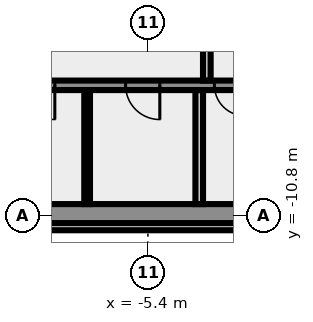
"""IFC4 building model, lengths in metres.
Left out: names, types, materials, properties, quantities, classifications, styles, units other than length and angle.
Written with IfcOpenShell. Run it as: python <this file> out.ifc"""

import sys

from ifc_helpers import new_model, si_unit, direction, frame, frame_2d, origin, place, context, subcontext, project, spatial, rectangle, extrude, element, fill, save


model = new_model("IFC4")
c1 = context("Model", 3, precision=1e-05, world=origin(), true_north=direction((0.0, 1.0)))
c2 = subcontext(c1, "Body", "Model", "MODEL_VIEW")
j1 = project(units=[si_unit("LENGTHUNIT", "METRE"), si_unit("PLANEANGLEUNIT", "RADIAN")], contexts=[c1])
p1 = place(None, origin())
s1 = spatial("IfcSite", under=j1, at=p1, CompositionType="ELEMENT")
p2 = place(p1, origin())
s2 = spatial("IfcBuilding", under=s1, at=p2, CompositionType="ELEMENT")
p3 = place(p2, frame((0.0, 0.0, 144.0)))
s3 = spatial("IfcBuildingStorey", under=s2, at=p3, CompositionType="ELEMENT", Elevation=144.0)
p4 = place(p3, frame((-17.444, -11.088, 0.0), z_axis=(0.0, 0.0, 1.0), x_axis=(1.0, 0.0, 0.0)))
e1 = element("IfcWall", 1, at=p4, inside=s3, PredefinedType="SOLIDWALL", context=c2, shape_type="SweptSolid", body=[
    extrude(rectangle(XDim=34.888, YDim=0.2, at=frame_2d((17.444, 0.0))), origin(), (0.0, 0.0, 1.0), 3.65),
])
p5 = place(p3, frame((-20.0, -10.75, 0.0), z_axis=(0.0, 0.0, 1.0), x_axis=(1.0, 0.0, 0.0)))
e2 = element("IfcWall", 2, at=p5, inside=s3, PredefinedType="SHEAR", context=c2, shape_type="SweptSolid", body=[
    extrude(rectangle(XDim=40.0, YDim=0.5, at=frame_2d((20.0, 0.0))), origin(), (0.0, 0.0, 1.0), 3.65),
])
p6 = place(p5, frame((0.8, 0.0, 1.0)))
e3 = element("IfcOpeningElement", 3, at=p6, cuts=e2, PredefinedType="OPENING", context=c2, shape_type="SweptSolid", body=[
    extrude(rectangle(XDim=1.2, YDim=1.2, at=frame_2d((0.6, 0.6))), frame((0.0, 0.26, 0.0), z_axis=(0.0, -1.0, 0.0), x_axis=(1.0, 0.0, 0.0)), (0.0, 0.0, 1.0), 0.52),
])
p7 = place(p5, frame((38.0, 0.0, 1.0)))
e4 = element("IfcOpeningElement", 4, at=p7, cuts=e2, PredefinedType="OPENING", context=c2, shape_type="SweptSolid", body=[
    extrude(rectangle(XDim=1.2, YDim=1.2, at=frame_2d((0.6, 0.6))), frame((0.0, 0.26, 0.0), z_axis=(0.0, -1.0, 0.0), x_axis=(1.0, 0.0, 0.0)), (0.0, 0.0, 1.0), 0.52),
])
p8 = place(p3, frame((-7.0, -10.5, 0.0), z_axis=(0.0, 0.0, 1.0), x_axis=(0.0, 1.0, 0.0)))
e5 = element("IfcWall", 5, at=p8, inside=s3, PredefinedType="PARTITIONING", context=c2, shape_type="SweptSolid", body=[
    extrude(rectangle(XDim=3.0, YDim=0.15, at=frame_2d((1.5, 0.0))), origin(), (0.0, 0.0, 1.0), 3.65),
])
p9 = place(p3, frame((-4.05, -10.5, 0.0), z_axis=(0.0, 0.0, 1.0), x_axis=(0.0, 1.0, 0.0)))
e6 = element("IfcWall", 6, at=p9, inside=s3, PredefinedType="SOLIDWALL", context=c2, shape_type="SweptSolid", body=[
    extrude(rectangle(XDim=3.0, YDim=0.2, at=frame_2d((1.5, 0.0))), origin(), (0.0, 0.0, 1.0), 3.65),
])
p10 = place(p3, frame((11.7, -7.375, 0.0), z_axis=(0.0, 0.0, 1.0), x_axis=(-1.0, 0.0, 0.0)))
e7 = element("IfcWall", 7, at=p10, inside=s3, PredefinedType="SHEAR", context=c2, shape_type="SweptSolid", body=[
    extrude(rectangle(XDim=23.4, YDim=0.25, at=frame_2d((11.7, 0.0))), origin(), (0.0, 0.0, 1.0), 3.65),
])
p11 = place(p10, frame((21.812, 0.0, 0.0)))
e8 = element("IfcOpeningElement", 8, at=p11, cuts=e7, PredefinedType="OPENING", context=c2, shape_type="SweptSolid", body=[
    extrude(rectangle(XDim=0.9, YDim=2.1, at=frame_2d((0.45, 1.05))), frame((0.0, 0.135, 0.0), z_axis=(0.0, -1.0, 0.0), x_axis=(1.0, 0.0, 0.0)), (0.0, 0.0, 1.0), 0.27),
])
p12 = place(p10, frame((19.55, 0.0, 0.0)))
e9 = element("IfcOpeningElement", 9, at=p12, cuts=e7, PredefinedType="OPENING", context=c2, shape_type="SweptSolid", body=[
    extrude(rectangle(XDim=0.9, YDim=2.1, at=frame_2d((0.45, 1.05))), frame((0.0, 0.135, 0.0), z_axis=(0.0, -1.0, 0.0), x_axis=(1.0, 0.0, 0.0)), (0.0, 0.0, 1.0), 0.27),
])
p13 = place(p10, frame((16.787, 0.0, 0.0)))
e10 = element("IfcOpeningElement", 10, at=p13, cuts=e7, PredefinedType="OPENING", context=c2, shape_type="SweptSolid", body=[
    extrude(rectangle(XDim=0.9, YDim=2.1, at=frame_2d((0.45, 1.05))), frame((0.0, 0.135, 0.0), z_axis=(0.0, -1.0, 0.0), x_axis=(1.0, 0.0, 0.0)), (0.0, 0.0, 1.0), 0.27),
])
p14 = place(p10, frame((14.55, 0.0, 0.0)))
e11 = element("IfcOpeningElement", 11, at=p14, cuts=e7, PredefinedType="OPENING", context=c2, shape_type="SweptSolid", body=[
    extrude(rectangle(XDim=0.8, YDim=2.1, at=frame_2d((0.4, 1.05))), frame((0.0, 0.135, 0.0), z_axis=(0.0, -1.0, 0.0), x_axis=(1.0, 0.0, 0.0)), (0.0, 0.0, 1.0), 0.27),
])
p15 = place(p10, frame((12.8, 0.0, 0.0)))
e12 = element("IfcOpeningElement", 12, at=p15, cuts=e7, PredefinedType="OPENING", context=c2, shape_type="SweptSolid", body=[
    extrude(rectangle(XDim=0.9, YDim=2.1, at=frame_2d((0.45, 1.05))), frame((0.0, 0.135, 0.0), z_axis=(0.0, -1.0, 0.0), x_axis=(1.0, 0.0, 0.0)), (0.0, 0.0, 1.0), 0.27),
])
p16 = place(p10, frame((10.7, 0.0, 0.0)))
e13 = element("IfcOpeningElement", 13, at=p16, cuts=e7, PredefinedType="OPENING", context=c2, shape_type="SweptSolid", body=[
    extrude(rectangle(XDim=0.9, YDim=2.1, at=frame_2d((0.45, 1.05))), frame((0.0, 0.135, 0.0), z_axis=(0.0, -1.0, 0.0), x_axis=(1.0, 0.0, 0.0)), (0.0, 0.0, 1.0), 0.27),
])
p17 = place(p10, frame((8.35, 0.0, 0.0)))
e14 = element("IfcOpeningElement", 14, at=p17, cuts=e7, PredefinedType="OPENING", context=c2, shape_type="SweptSolid", body=[
    extrude(rectangle(XDim=1.1, YDim=2.1, at=frame_2d((0.55, 1.05))), frame((0.0, 0.135, 0.0), z_axis=(0.0, -1.0, 0.0), x_axis=(1.0, 0.0, 0.0)), (0.0, 0.0, 1.0), 0.27),
])
p18 = place(p10, frame((5.85, 0.0, 0.0)))
e15 = element("IfcOpeningElement", 15, at=p18, cuts=e7, PredefinedType="OPENING", context=c2, shape_type="SweptSolid", body=[
    extrude(rectangle(XDim=1.1, YDim=2.1, at=frame_2d((0.55, 1.05))), frame((0.0, 0.135, 0.0), z_axis=(0.0, -1.0, 0.0), x_axis=(1.0, 0.0, 0.0)), (0.0, 0.0, 1.0), 0.27),
])
p19 = place(p10, frame((3.35, 0.0, 0.0)))
e16 = element("IfcOpeningElement", 16, at=p19, cuts=e7, PredefinedType="OPENING", context=c2, shape_type="SweptSolid", body=[
    extrude(rectangle(XDim=1.1, YDim=2.1, at=frame_2d((0.55, 1.05))), frame((0.0, 0.135, 0.0), z_axis=(0.0, -1.0, 0.0), x_axis=(1.0, 0.0, 0.0)), (0.0, 0.0, 1.0), 0.27),
])
p20 = place(p10, frame((0.85, 0.0, 0.0)))
e17 = element("IfcOpeningElement", 17, at=p20, cuts=e7, PredefinedType="OPENING", context=c2, shape_type="SweptSolid", body=[
    extrude(rectangle(XDim=1.1, YDim=2.1, at=frame_2d((0.55, 1.05))), frame((0.0, 0.135, 0.0), z_axis=(0.0, -1.0, 0.0), x_axis=(1.0, 0.0, 0.0)), (0.0, 0.0, 1.0), 0.27),
])
p21 = place(p3, frame((-3.85, -4.25, 0.0), z_axis=(0.0, 0.0, 1.0), x_axis=(0.0, -1.0, 0.0)))
e18 = element("IfcWall", 18, at=p21, inside=s3, PredefinedType="SOLIDWALL", context=c2, shape_type="SweptSolid", body=[
    extrude(rectangle(XDim=3.0, YDim=0.2, at=frame_2d((1.5, 0.0))), origin(), (0.0, 0.0, 1.0), 3.65),
])
p22 = place(p21, frame((0.8, 0.0, 0.0)))
e19 = element("IfcOpeningElement", 19, at=p22, cuts=e18, PredefinedType="OPENING", context=c2, shape_type="SweptSolid", body=[
    extrude(rectangle(XDim=1.4, YDim=2.1, at=frame_2d((0.7, 1.05))), frame((0.0, 0.11, 0.0), z_axis=(0.0, -1.0, 0.0), x_axis=(1.0, 0.0, 0.0)), (0.0, 0.0, 1.0), 0.22),
])
p23 = place(p12, origin())
e20 = element("IfcDoor", 20, at=p23, inside=s3, OperationType="SINGLE_SWING_RIGHT", PredefinedType="DOOR", context=c2, shape_type="SweptSolid", body=[
    extrude(rectangle(XDim=0.9, YDim=2.1, at=frame_2d((0.45, 1.05))), frame((0.0, 0.025, 0.0), z_axis=(0.0, -1.0, 0.0), x_axis=(1.0, 0.0, 0.0)), (0.0, 0.0, 1.0), 0.05),
])
fill(e9, e20)
p24 = place(p13, origin())
e21 = element("IfcDoor", 21, at=p24, inside=s3, OperationType="SINGLE_SWING_RIGHT", PredefinedType="DOOR", context=c2, shape_type="SweptSolid", body=[
    extrude(rectangle(XDim=0.9, YDim=2.1, at=frame_2d((0.45, 1.05))), frame((0.0, 0.025, 0.0), z_axis=(0.0, -1.0, 0.0), x_axis=(1.0, 0.0, 0.0)), (0.0, 0.0, 1.0), 0.05),
])
fill(e10, e21)
p25 = place(p14, origin())
e22 = element("IfcDoor", 22, at=p25, inside=s3, OperationType="SINGLE_SWING_RIGHT", PredefinedType="DOOR", context=c2, shape_type="SweptSolid", body=[
    extrude(rectangle(XDim=0.8, YDim=2.1, at=frame_2d((0.4, 1.05))), frame((0.0, 0.025, 0.0), z_axis=(0.0, -1.0, 0.0), x_axis=(1.0, 0.0, 0.0)), (0.0, 0.0, 1.0), 0.05),
])
fill(e11, e22)
save(model, sys.argv[1])
